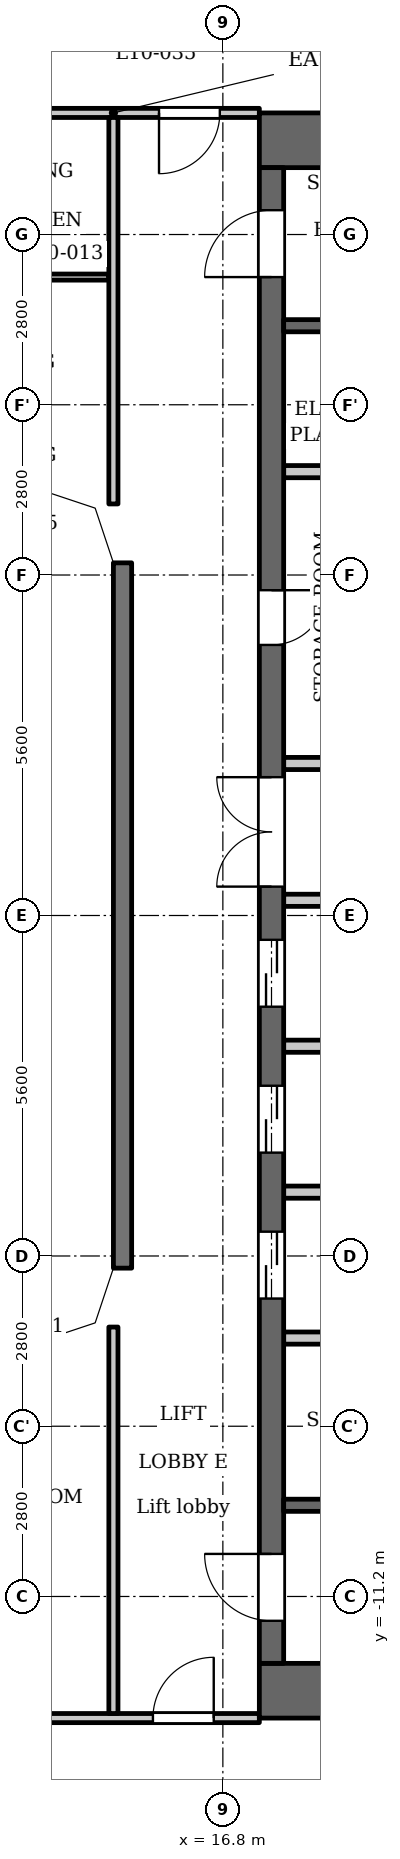
"""IFC4 building model, lengths in metres.
Left out: names, types, materials, properties, quantities, classifications, styles, units other than length and angle.
Written with IfcOpenShell. Run it as: python <this file> out.ifc"""

import sys

from ifc_helpers import new_model, si_unit, direction, frame, frame_2d, origin, place, context, subcontext, project, spatial, polyline, rectangle, outline, extrude, element, fill, save


model = new_model("IFC4")
c1 = context("Model", 3, precision=1e-05, world=origin(), true_north=direction((0.0, 1.0)))
c2 = subcontext(c1, "Body", "Model", "MODEL_VIEW")
j1 = project(units=[si_unit("LENGTHUNIT", "METRE"), si_unit("PLANEANGLEUNIT", "RADIAN")], contexts=[c1])
p1 = place(None, origin())
s1 = spatial("IfcSite", under=j1, at=p1, CompositionType="ELEMENT")
p2 = place(p1, origin())
s2 = spatial("IfcBuilding", under=s1, at=p2, CompositionType="ELEMENT")
p3 = place(p2, frame((0.0, 0.0, 44.5)))
s3 = spatial("IfcBuildingStorey", under=s2, at=p3, CompositionType="ELEMENT", Elevation=44.5)
p4 = place(p3, frame((15.15, 5.8, 0.0), z_axis=(0.0, 0.0, 1.0), x_axis=(0.0, -1.0, 0.0)))
e1 = element("IfcWall", 1, at=p4, inside=s3, PredefinedType="SOLIDWALL", context=c2, shape_type="SweptSolid", body=[
    extrude(rectangle(XDim=11.6, YDim=0.3, at=frame_2d((5.8, 0.0))), origin(), (0.0, 0.0, 1.0), 3.2),
])
for number, where, z_axis, x_axis in (
    (2, (17.4, 12.75, 0.0), (0.0, 0.0, 1.0), (1.0, 0.0, 0.0)),
    (3, (17.4, -12.75, 0.0), (0.0, 0.0, 1.0), (1.0, 0.0, 0.0)),
):
    element("IfcWall", number, at=place(p3, frame(where, z_axis=z_axis, x_axis=x_axis)), inside=s3, PredefinedType="SHEAR", context=c2, shape_type="SweptSolid", body=[
        extrude(rectangle(XDim=10.4, YDim=0.9, at=frame_2d((5.2, 0.0))), origin(), (0.0, 0.0, 1.0), 3.2),
    ])
p5 = place(p3, frame((17.6, -12.3, 0.0), z_axis=(0.0, 0.0, 1.0), x_axis=(0.0, 1.0, 0.0)))
e4 = element("IfcWall", 4, at=p5, inside=s3, PredefinedType="SHEAR", context=c2, shape_type="SweptSolid", body=[
    extrude(rectangle(XDim=24.6, YDim=0.4, at=frame_2d((12.3, 0.0))), origin(), (0.0, 0.0, 1.0), 3.2),
])
p6 = place(p5, frame((6.0, 0.0, 0.0)))
e5 = element("IfcOpeningElement", 5, at=p6, cuts=e4, PredefinedType="OPENING", context=c2, shape_type="SweptSolid", body=[
    extrude(rectangle(XDim=1.1, YDim=2.1, at=frame_2d((0.55, 1.05))), frame((0.0, 0.21, 0.0), z_axis=(0.0, -1.0, 0.0), x_axis=(1.0, 0.0, 0.0)), (0.0, 0.0, 1.0), 0.42),
])
p7 = place(p5, frame((8.4, 0.0, 0.0)))
e6 = element("IfcOpeningElement", 6, at=p7, cuts=e4, PredefinedType="OPENING", context=c2, shape_type="SweptSolid", body=[
    extrude(rectangle(XDim=1.1, YDim=2.1, at=frame_2d((0.55, 1.05))), frame((0.0, 0.21, 0.0), z_axis=(0.0, -1.0, 0.0), x_axis=(1.0, 0.0, 0.0)), (0.0, 0.0, 1.0), 0.42),
])
p8 = place(p5, frame((10.8, 0.0, 0.0)))
e7 = element("IfcOpeningElement", 7, at=p8, cuts=e4, PredefinedType="OPENING", context=c2, shape_type="SweptSolid", body=[
    extrude(rectangle(XDim=1.1, YDim=2.1, at=frame_2d((0.55, 1.05))), frame((0.0, 0.21, 0.0), z_axis=(0.0, -1.0, 0.0), x_axis=(1.0, 0.0, 0.0)), (0.0, 0.0, 1.0), 0.42),
])
p9 = place(p5, frame((16.75, 0.0, 0.0)))
e8 = element("IfcOpeningElement", 8, at=p9, cuts=e4, PredefinedType="OPENING", context=c2, shape_type="SweptSolid", body=[
    extrude(rectangle(XDim=0.9, YDim=2.1, at=frame_2d((0.45, 1.05))), frame((0.0, 0.21, 0.0), z_axis=(0.0, -1.0, 0.0), x_axis=(1.0, 0.0, 0.0)), (0.0, 0.0, 1.0), 0.42),
])
p10 = place(p5, frame((22.8, 0.0, 0.0)))
e9 = element("IfcOpeningElement", 9, at=p10, cuts=e4, PredefinedType="OPENING", context=c2, shape_type="SweptSolid", body=[
    extrude(rectangle(XDim=1.1, YDim=2.1, at=frame_2d((0.55, 1.05))), frame((0.0, 0.21, 0.0), z_axis=(0.0, -1.0, 0.0), x_axis=(1.0, 0.0, 0.0)), (0.0, 0.0, 1.0), 0.42),
])
p11 = place(p5, frame((0.7, 0.0, 0.0)))
e10 = element("IfcOpeningElement", 10, at=p11, cuts=e4, PredefinedType="OPENING", context=c2, shape_type="SweptSolid", body=[
    extrude(rectangle(XDim=1.1, YDim=2.1, at=frame_2d((0.55, 1.05))), frame((0.0, 0.21, 0.0), z_axis=(0.0, -1.0, 0.0), x_axis=(1.0, 0.0, 0.0)), (0.0, 0.0, 1.0), 0.42),
])
p12 = place(p5, frame((12.775, 0.0, 0.0)))
e11 = element("IfcOpeningElement", 11, at=p12, cuts=e4, PredefinedType="OPENING", context=c2, shape_type="SweptSolid", body=[
    extrude(rectangle(XDim=1.8, YDim=2.1, at=frame_2d((0.9, 1.05))), frame((0.0, 0.21, 0.0), z_axis=(0.0, -1.0, 0.0), x_axis=(1.0, 0.0, 0.0)), (0.0, 0.0, 1.0), 0.42),
])
p13 = place(p3, frame((17.8, -9.7, 0.0), z_axis=(0.0, 0.0, 1.0), x_axis=(1.0, 0.0, 0.0)))
e12 = element("IfcWall", 12, at=p13, inside=s3, PredefinedType="SHEAR", context=c2, shape_type="SweptSolid", body=[
    extrude(rectangle(XDim=8.3, YDim=0.2, at=frame_2d((4.15, 0.0))), origin(), (0.0, 0.0, 1.0), 3.2),
])
p14 = place(p13, frame((0.85, 0.0, 0.0)))
e13 = element("IfcOpeningElement", 13, at=p14, cuts=e12, PredefinedType="OPENING", context=c2, shape_type="SweptSolid", body=[
    extrude(rectangle(XDim=1.1, YDim=2.1, at=frame_2d((0.55, 1.05))), frame((0.0, 0.11, 0.0), z_axis=(0.0, -1.0, 0.0), x_axis=(1.0, 0.0, 0.0)), (0.0, 0.0, 1.0), 0.22),
])
p15 = place(p13, frame((3.75, 0.0, 0.0)))
e14 = element("IfcOpeningElement", 14, at=p15, cuts=e12, PredefinedType="OPENING", context=c2, shape_type="SweptSolid", body=[
    extrude(rectangle(XDim=1.1, YDim=2.1, at=frame_2d((0.55, 1.05))), frame((0.0, 0.11, 0.0), z_axis=(0.0, -1.0, 0.0), x_axis=(1.0, 0.0, 0.0)), (0.0, 0.0, 1.0), 0.22),
])
for number, where, z_axis, x_axis in (
    (15, (17.8, -6.95, 0.0), (0.0, 0.0, 1.0), (1.0, 0.0, 0.0)),
    (16, (17.8, -4.55, 0.0), (0.0, 0.0, 1.0), (1.0, 0.0, 0.0)),
    (17, (17.8, -2.15, 0.0), (0.0, 0.0, 1.0), (1.0, 0.0, 0.0)),
):
    element("IfcWall", number, at=place(p3, frame(where, z_axis=z_axis, x_axis=x_axis)), inside=s3, PredefinedType="PARTITIONING", context=c2, shape_type="SweptSolid", body=[
        extrude(rectangle(XDim=2.8, YDim=0.2, at=frame_2d((1.4, 0.0))), origin(), (0.0, 0.0, 1.0), 3.2),
    ])
p16 = place(p3, frame((17.8, 0.25, 0.0), z_axis=(0.0, 0.0, 1.0), x_axis=(1.0, 0.0, 0.0)))
e18 = element("IfcWall", 18, at=p16, inside=s3, PredefinedType="PARTITIONING", context=c2, shape_type="SweptSolid", body=[
    extrude(rectangle(XDim=3.0, YDim=0.2, at=frame_2d((1.5, 0.0))), origin(), (0.0, 0.0, 1.0), 3.2),
])
p17 = place(p3, frame((17.8, 2.5, 0.0), z_axis=(0.0, 0.0, 1.0), x_axis=(1.0, 0.0, 0.0)))
e19 = element("IfcWall", 19, at=p17, inside=s3, PredefinedType="PARTITIONING", context=c2, shape_type="SweptSolid", body=[
    extrude(rectangle(XDim=3.0, YDim=0.2, at=frame_2d((1.5, 0.0))), origin(), (0.0, 0.0, 1.0), 3.2),
])
p18 = place(p17, frame((1.7, 0.0, 0.0)))
e20 = element("IfcOpeningElement", 20, at=p18, cuts=e19, PredefinedType="OPENING", context=c2, shape_type="SweptSolid", body=[
    extrude(rectangle(XDim=0.9, YDim=2.1, at=frame_2d((0.45, 1.05))), frame((0.0, 0.11, 0.0), z_axis=(0.0, -1.0, 0.0), x_axis=(1.0, 0.0, 0.0)), (0.0, 0.0, 1.0), 0.22),
])
p19 = place(p3, frame((17.8, 7.3, 0.0), z_axis=(0.0, 0.0, 1.0), x_axis=(1.0, 0.0, 0.0)))
e21 = element("IfcWall", 21, at=p19, inside=s3, PredefinedType="PARTITIONING", context=c2, shape_type="SweptSolid", body=[
    extrude(rectangle(XDim=2.8, YDim=0.2, at=frame_2d((1.4, 0.0))), origin(), (0.0, 0.0, 1.0), 3.2),
])
p20 = place(p3, frame((17.8, 9.7, 0.0), z_axis=(0.0, 0.0, 1.0), x_axis=(1.0, 0.0, 0.0)))
e22 = element("IfcWall", 22, at=p20, inside=s3, PredefinedType="SHEAR", context=c2, shape_type="SweptSolid", body=[
    extrude(rectangle(XDim=8.3, YDim=0.2, at=frame_2d((4.15, 0.0))), origin(), (0.0, 0.0, 1.0), 3.2),
])
p21 = place(p20, frame((0.85, 0.0, 0.0)))
e23 = element("IfcOpeningElement", 23, at=p21, cuts=e22, PredefinedType="OPENING", context=c2, shape_type="SweptSolid", body=[
    extrude(rectangle(XDim=1.1, YDim=2.1, at=frame_2d((0.55, 1.05))), frame((0.0, 0.11, 0.0), z_axis=(0.0, -1.0, 0.0), x_axis=(1.0, 0.0, 0.0)), (0.0, 0.0, 1.0), 0.22),
])
p22 = place(p20, frame((3.75, 0.0, 0.0)))
e24 = element("IfcOpeningElement", 24, at=p22, cuts=e22, PredefinedType="OPENING", context=c2, shape_type="SweptSolid", body=[
    extrude(rectangle(XDim=1.1, YDim=2.1, at=frame_2d((0.55, 1.05))), frame((0.0, 0.11, 0.0), z_axis=(0.0, -1.0, 0.0), x_axis=(1.0, 0.0, 0.0)), (0.0, 0.0, 1.0), 0.22),
])
p23 = place(p3, frame((-17.4, -13.2, 0.0), z_axis=(0.0, 0.0, 1.0), x_axis=(1.0, 0.0, 0.0)))
e25 = element("IfcWall", 25, at=p23, inside=s3, PredefinedType="PARTITIONING", context=c2, shape_type="SweptSolid", body=[
    extrude(rectangle(XDim=34.8, YDim=0.15, at=frame_2d((17.4, 0.0))), origin(), (0.0, 0.0, 1.0), 3.2),
])
p24 = place(p23, frame((0.65, 0.0, 0.0)))
e26 = element("IfcOpeningElement", 26, at=p24, cuts=e25, PredefinedType="OPENING", context=c2, shape_type="SweptSolid", body=[
    extrude(rectangle(XDim=1.0, YDim=2.1, at=frame_2d((0.5, 1.05))), frame((0.0, 0.085, 0.0), z_axis=(0.0, -1.0, 0.0), x_axis=(1.0, 0.0, 0.0)), (0.0, 0.0, 1.0), 0.17),
])
p25 = place(p23, frame((33.05, 0.0, 0.0)))
e27 = element("IfcOpeningElement", 27, at=p25, cuts=e25, PredefinedType="OPENING", context=c2, shape_type="SweptSolid", body=[
    extrude(rectangle(XDim=1.0, YDim=2.1, at=frame_2d((0.5, 1.05))), frame((0.0, 0.085, 0.0), z_axis=(0.0, -1.0, 0.0), x_axis=(1.0, 0.0, 0.0)), (0.0, 0.0, 1.0), 0.17),
])
p26 = place(p23, frame((4.55, 0.0, 0.0)))
e28 = element("IfcOpeningElement", 28, at=p26, cuts=e25, PredefinedType="OPENING", context=c2, shape_type="SweptSolid", body=[
    extrude(rectangle(XDim=1.0, YDim=2.1, at=frame_2d((0.5, 1.05))), frame((0.0, 0.085, 0.0), z_axis=(0.0, -1.0, 0.0), x_axis=(1.0, 0.0, 0.0)), (0.0, 0.0, 1.0), 0.17),
])
p27 = place(p23, frame((6.9, 0.0, 0.0)))
e29 = element("IfcOpeningElement", 29, at=p27, cuts=e25, PredefinedType="OPENING", context=c2, shape_type="SweptSolid", body=[
    extrude(rectangle(XDim=1.0, YDim=2.1, at=frame_2d((0.5, 1.05))), frame((0.0, 0.085, 0.0), z_axis=(0.0, -1.0, 0.0), x_axis=(1.0, 0.0, 0.0)), (0.0, 0.0, 1.0), 0.17),
])
p28 = place(p23, frame((15.75, 0.0, 0.0)))
e30 = element("IfcOpeningElement", 30, at=p28, cuts=e25, PredefinedType="OPENING", context=c2, shape_type="SweptSolid", body=[
    extrude(rectangle(XDim=1.0, YDim=2.1, at=frame_2d((0.5, 1.05))), frame((0.0, 0.085, 0.0), z_axis=(0.0, -1.0, 0.0), x_axis=(1.0, 0.0, 0.0)), (0.0, 0.0, 1.0), 0.17),
])
p29 = place(p23, frame((18.1, 0.0, 0.0)))
e31 = element("IfcOpeningElement", 31, at=p29, cuts=e25, PredefinedType="OPENING", context=c2, shape_type="SweptSolid", body=[
    extrude(rectangle(XDim=1.0, YDim=2.1, at=frame_2d((0.5, 1.05))), frame((0.0, 0.085, 0.0), z_axis=(0.0, -1.0, 0.0), x_axis=(1.0, 0.0, 0.0)), (0.0, 0.0, 1.0), 0.17),
])
p30 = place(p23, frame((26.95, 0.0, 0.0)))
e32 = element("IfcOpeningElement", 32, at=p30, cuts=e25, PredefinedType="OPENING", context=c2, shape_type="SweptSolid", body=[
    extrude(rectangle(XDim=1.0, YDim=2.1, at=frame_2d((0.5, 1.05))), frame((0.0, 0.085, 0.0), z_axis=(0.0, -1.0, 0.0), x_axis=(1.0, 0.0, 0.0)), (0.0, 0.0, 1.0), 0.17),
])
p31 = place(p23, frame((29.25, 0.0, 0.0)))
e33 = element("IfcOpeningElement", 33, at=p31, cuts=e25, PredefinedType="OPENING", context=c2, shape_type="SweptSolid", body=[
    extrude(rectangle(XDim=1.0, YDim=2.1, at=frame_2d((0.5, 1.05))), frame((0.0, 0.085, 0.0), z_axis=(0.0, -1.0, 0.0), x_axis=(1.0, 0.0, 0.0)), (0.0, 0.0, 1.0), 0.17),
])
p32 = place(p3, frame((-14.925, 10.5, 0.0), z_axis=(0.0, 0.0, 1.0), x_axis=(1.0, 0.0, 0.0)))
e34 = element("IfcWall", 34, at=p32, inside=s3, PredefinedType="PARTITIONING", context=c2, shape_type="SweptSolid", body=[
    extrude(rectangle(XDim=29.85, YDim=0.1, at=frame_2d((14.925, 0.0))), origin(), (0.0, 0.0, 1.0), 3.2),
])
p33 = place(p32, frame((4.375, 0.0, 0.0)))
e35 = element("IfcOpeningElement", 35, at=p33, cuts=e34, PredefinedType="OPENING", context=c2, shape_type="SweptSolid", body=[
    extrude(rectangle(XDim=0.8, YDim=2.1, at=frame_2d((0.4, 1.05))), frame((0.0, 0.06, 0.0), z_axis=(0.0, -1.0, 0.0), x_axis=(1.0, 0.0, 0.0)), (0.0, 0.0, 1.0), 0.12),
])
p34 = place(p32, frame((0.575, 0.0, 0.0)))
e36 = element("IfcOpeningElement", 36, at=p34, cuts=e34, PredefinedType="OPENING", context=c2, shape_type="SweptSolid", body=[
    extrude(rectangle(XDim=0.9, YDim=2.1, at=frame_2d((0.45, 1.05))), frame((0.0, 0.06, 0.0), z_axis=(0.0, -1.0, 0.0), x_axis=(1.0, 0.0, 0.0)), (0.0, 0.0, 1.0), 0.12),
])
p35 = place(p32, frame((13.475, 0.0, 0.0)))
e37 = element("IfcOpeningElement", 37, at=p35, cuts=e34, PredefinedType="OPENING", context=c2, shape_type="SweptSolid", body=[
    extrude(rectangle(XDim=0.8, YDim=2.1, at=frame_2d((0.4, 1.05))), frame((0.0, 0.06, 0.0), z_axis=(0.0, -1.0, 0.0), x_axis=(1.0, 0.0, 0.0)), (0.0, 0.0, 1.0), 0.12),
])
p36 = place(p32, frame((9.975, 0.0, 0.0)))
e38 = element("IfcOpeningElement", 38, at=p36, cuts=e34, PredefinedType="OPENING", context=c2, shape_type="SweptSolid", body=[
    extrude(rectangle(XDim=0.9, YDim=2.1, at=frame_2d((0.45, 1.05))), frame((0.0, 0.06, 0.0), z_axis=(0.0, -1.0, 0.0), x_axis=(1.0, 0.0, 0.0)), (0.0, 0.0, 1.0), 0.12),
])
p37 = place(p32, frame((19.075, 0.0, 0.0)))
e39 = element("IfcOpeningElement", 39, at=p37, cuts=e34, PredefinedType="OPENING", context=c2, shape_type="SweptSolid", body=[
    extrude(rectangle(XDim=0.8, YDim=2.1, at=frame_2d((0.4, 1.05))), frame((0.0, 0.06, 0.0), z_axis=(0.0, -1.0, 0.0), x_axis=(1.0, 0.0, 0.0)), (0.0, 0.0, 1.0), 0.12),
])
p38 = place(p32, frame((16.075, 0.0, 0.0)))
e40 = element("IfcOpeningElement", 40, at=p38, cuts=e34, PredefinedType="OPENING", context=c2, shape_type="SweptSolid", body=[
    extrude(rectangle(XDim=0.9, YDim=2.1, at=frame_2d((0.45, 1.05))), frame((0.0, 0.06, 0.0), z_axis=(0.0, -1.0, 0.0), x_axis=(1.0, 0.0, 0.0)), (0.0, 0.0, 1.0), 0.12),
])
p39 = place(p32, frame((21.175, 0.0, 0.0)))
e41 = element("IfcOpeningElement", 41, at=p39, cuts=e34, PredefinedType="OPENING", context=c2, shape_type="SweptSolid", body=[
    extrude(rectangle(XDim=0.8, YDim=2.1, at=frame_2d((0.4, 1.05))), frame((0.0, 0.06, 0.0), z_axis=(0.0, -1.0, 0.0), x_axis=(1.0, 0.0, 0.0)), (0.0, 0.0, 1.0), 0.12),
])
p40 = place(p32, frame((26.775, 0.0, 0.0)))
e42 = element("IfcOpeningElement", 42, at=p40, cuts=e34, PredefinedType="OPENING", context=c2, shape_type="SweptSolid", body=[
    extrude(rectangle(XDim=0.9, YDim=2.1, at=frame_2d((0.45, 1.05))), frame((0.0, 0.06, 0.0), z_axis=(0.0, -1.0, 0.0), x_axis=(1.0, 0.0, 0.0)), (0.0, 0.0, 1.0), 0.12),
])
p41 = place(p3, frame((-17.4, 13.2, 0.0), z_axis=(0.0, 0.0, 1.0), x_axis=(1.0, 0.0, 0.0)))
e43 = element("IfcWall", 43, at=p41, inside=s3, PredefinedType="PARTITIONING", context=c2, shape_type="SweptSolid", body=[
    extrude(rectangle(XDim=34.8, YDim=0.15, at=frame_2d((17.4, 0.0))), origin(), (0.0, 0.0, 1.0), 3.2),
])
p42 = place(p41, frame((0.75, 0.0, 0.0)))
e44 = element("IfcOpeningElement", 44, at=p42, cuts=e43, PredefinedType="OPENING", context=c2, shape_type="SweptSolid", body=[
    extrude(rectangle(XDim=1.0, YDim=2.1, at=frame_2d((0.5, 1.05))), frame((0.0, 0.085, 0.0), z_axis=(0.0, -1.0, 0.0), x_axis=(1.0, 0.0, 0.0)), (0.0, 0.0, 1.0), 0.17),
])
p43 = place(p41, frame((33.15, 0.0, 0.0)))
e45 = element("IfcOpeningElement", 45, at=p43, cuts=e43, PredefinedType="OPENING", context=c2, shape_type="SweptSolid", body=[
    extrude(rectangle(XDim=1.0, YDim=2.1, at=frame_2d((0.5, 1.05))), frame((0.0, 0.085, 0.0), z_axis=(0.0, -1.0, 0.0), x_axis=(1.0, 0.0, 0.0)), (0.0, 0.0, 1.0), 0.17),
])
p44 = place(p41, frame((3.05, 0.0, 0.0)))
e46 = element("IfcOpeningElement", 46, at=p44, cuts=e43, PredefinedType="OPENING", context=c2, shape_type="SweptSolid", body=[
    extrude(rectangle(XDim=1.0, YDim=2.1, at=frame_2d((0.5, 1.05))), frame((0.0, 0.085, 0.0), z_axis=(0.0, -1.0, 0.0), x_axis=(1.0, 0.0, 0.0)), (0.0, 0.0, 1.0), 0.17),
])
p45 = place(p41, frame((12.45, 0.0, 0.0)))
e47 = element("IfcOpeningElement", 47, at=p45, cuts=e43, PredefinedType="OPENING", context=c2, shape_type="SweptSolid", body=[
    extrude(rectangle(XDim=1.0, YDim=2.1, at=frame_2d((0.5, 1.05))), frame((0.0, 0.085, 0.0), z_axis=(0.0, -1.0, 0.0), x_axis=(1.0, 0.0, 0.0)), (0.0, 0.0, 1.0), 0.17),
])
p46 = place(p41, frame((18.3, 0.0, 0.0)))
e48 = element("IfcOpeningElement", 48, at=p46, cuts=e43, PredefinedType="OPENING", context=c2, shape_type="SweptSolid", body=[
    extrude(rectangle(XDim=1.0, YDim=2.1, at=frame_2d((0.5, 1.05))), frame((0.0, 0.085, 0.0), z_axis=(0.0, -1.0, 0.0), x_axis=(1.0, 0.0, 0.0)), (0.0, 0.0, 1.0), 0.17),
])
p47 = place(p41, frame((29.25, 0.0, 0.0)))
e49 = element("IfcOpeningElement", 49, at=p47, cuts=e43, PredefinedType="OPENING", context=c2, shape_type="SweptSolid", body=[
    extrude(rectangle(XDim=1.0, YDim=2.1, at=frame_2d((0.5, 1.05))), frame((0.0, 0.085, 0.0), z_axis=(0.0, -1.0, 0.0), x_axis=(1.0, 0.0, 0.0)), (0.0, 0.0, 1.0), 0.17),
])
for number, where, z_axis, x_axis in (
    (50, (15.0, -13.125, 0.0), (0.0, 0.0, 1.0), (0.0, 1.0, 0.0)),
    (51, (15.0, 6.769, 0.0), (0.0, 0.0, 1.0), (0.0, 1.0, 0.0)),
):
    element("IfcWall", number, at=place(p3, frame(where, z_axis=z_axis, x_axis=x_axis)), inside=s3, PredefinedType="PARTITIONING", context=c2, shape_type="SweptSolid", body=[
        extrude(rectangle(XDim=6.356, YDim=0.15, at=frame_2d((3.178, 0.0))), origin(), (0.0, 0.0, 1.0), 3.2),
    ])
p48 = place(p3, origin())
e52 = element("IfcWall", 52, at=p48, inside=s3, PredefinedType="SOLIDWALL", context=c2, shape_type="SweptSolid", body=[
    extrude(outline(polyline([(14.937, 6.937), (13.849, 7.3), (13.8, 7.3), (13.8, 7.0), (14.7, 6.7), (15.0, 5.8), (15.3, 5.8), (15.3, 5.849), (14.937, 6.937)])), origin(), (0.0, 0.0, 1.0), 3.2),
])
e53 = element("IfcWall", 53, at=p48, inside=s3, PredefinedType="SOLIDWALL", context=c2, shape_type="SweptSolid", body=[
    extrude(outline(polyline([(14.937, -6.937), (15.3, -5.849), (15.3, -5.8), (15.0, -5.8), (14.7, -6.7), (13.8, -7.0), (13.8, -7.3), (13.849, -7.3), (14.937, -6.937)])), origin(), (0.0, 0.0, 1.0), 3.2),
])
p49 = place(p6, origin())
e54 = element("IfcDoor", 54, at=p49, inside=s3, OperationType="DOUBLE_DOOR_SLIDING", PredefinedType="DOOR", context=c2, shape_type="SweptSolid", body=[
    extrude(rectangle(XDim=1.1, YDim=2.1, at=frame_2d((0.55, 1.05))), frame((0.0, 0.025, 0.0), z_axis=(0.0, -1.0, 0.0), x_axis=(1.0, 0.0, 0.0)), (0.0, 0.0, 1.0), 0.05),
])
fill(e5, e54)
p50 = place(p7, origin())
e55 = element("IfcDoor", 55, at=p50, inside=s3, OperationType="DOUBLE_DOOR_SLIDING", PredefinedType="DOOR", context=c2, shape_type="SweptSolid", body=[
    extrude(rectangle(XDim=1.1, YDim=2.1, at=frame_2d((0.55, 1.05))), frame((0.0, 0.025, 0.0), z_axis=(0.0, -1.0, 0.0), x_axis=(1.0, 0.0, 0.0)), (0.0, 0.0, 1.0), 0.05),
])
fill(e6, e55)
p51 = place(p8, origin())
e56 = element("IfcDoor", 56, at=p51, inside=s3, OperationType="DOUBLE_DOOR_SLIDING", PredefinedType="DOOR", context=c2, shape_type="SweptSolid", body=[
    extrude(rectangle(XDim=1.1, YDim=2.1, at=frame_2d((0.55, 1.05))), frame((0.0, 0.025, 0.0), z_axis=(0.0, -1.0, 0.0), x_axis=(1.0, 0.0, 0.0)), (0.0, 0.0, 1.0), 0.05),
])
fill(e7, e56)
p52 = place(p9, origin())
e57 = element("IfcDoor", 57, at=p52, inside=s3, OperationType="SINGLE_SWING_RIGHT", PredefinedType="DOOR", context=c2, shape_type="SweptSolid", body=[
    extrude(rectangle(XDim=0.9, YDim=2.1, at=frame_2d((0.45, 1.05))), frame((0.0, 0.025, 0.0), z_axis=(0.0, -1.0, 0.0), x_axis=(1.0, 0.0, 0.0)), (0.0, 0.0, 1.0), 0.05),
])
fill(e8, e57)
p53 = place(p10, origin())
e58 = element("IfcDoor", 58, at=p53, inside=s3, OperationType="SINGLE_SWING_RIGHT", PredefinedType="DOOR", context=c2, shape_type="SweptSolid", body=[
    extrude(rectangle(XDim=1.1, YDim=2.1, at=frame_2d((0.55, 1.05))), frame((0.0, 0.025, 0.0), z_axis=(0.0, -1.0, 0.0), x_axis=(1.0, 0.0, 0.0)), (0.0, 0.0, 1.0), 0.05),
])
fill(e9, e58)
p54 = place(p11, origin())
e59 = element("IfcDoor", 59, at=p54, inside=s3, OperationType="SINGLE_SWING_LEFT", PredefinedType="DOOR", context=c2, shape_type="SweptSolid", body=[
    extrude(rectangle(XDim=1.1, YDim=2.1, at=frame_2d((0.55, 1.05))), frame((0.0, 0.025, 0.0), z_axis=(0.0, -1.0, 0.0), x_axis=(1.0, 0.0, 0.0)), (0.0, 0.0, 1.0), 0.05),
])
fill(e10, e59)
p55 = place(p12, origin())
e60 = element("IfcDoor", 60, at=p55, inside=s3, OperationType="DOUBLE_DOOR_SINGLE_SWING", PredefinedType="DOOR", context=c2, shape_type="SweptSolid", body=[
    extrude(rectangle(XDim=1.8, YDim=2.1, at=frame_2d((0.9, 1.05))), frame((0.0, 0.025, 0.0), z_axis=(0.0, -1.0, 0.0), x_axis=(1.0, 0.0, 0.0)), (0.0, 0.0, 1.0), 0.05),
])
fill(e11, e60)
p56 = place(p43, origin())
e61 = element("IfcDoor", 61, at=p56, inside=s3, OperationType="SINGLE_SWING_LEFT", PredefinedType="DOOR", context=c2, shape_type="SweptSolid", body=[
    extrude(rectangle(XDim=1.0, YDim=2.1, at=frame_2d((0.5, 1.05))), frame((0.0, 0.025, 0.0), z_axis=(0.0, -1.0, 0.0), x_axis=(1.0, 0.0, 0.0)), (0.0, 0.0, 1.0), 0.05),
])
fill(e45, e61)
p57 = place(p25, origin())
e62 = element("IfcDoor", 62, at=p57, inside=s3, OperationType="SINGLE_SWING_LEFT", PredefinedType="DOOR", context=c2, shape_type="SweptSolid", body=[
    extrude(rectangle(XDim=1.0, YDim=2.1, at=frame_2d((0.5, 1.05))), frame((0.0, 0.025, 0.0), z_axis=(0.0, -1.0, 0.0), x_axis=(1.0, 0.0, 0.0)), (0.0, 0.0, 1.0), 0.05),
])
fill(e27, e62)
save(model, sys.argv[1])
